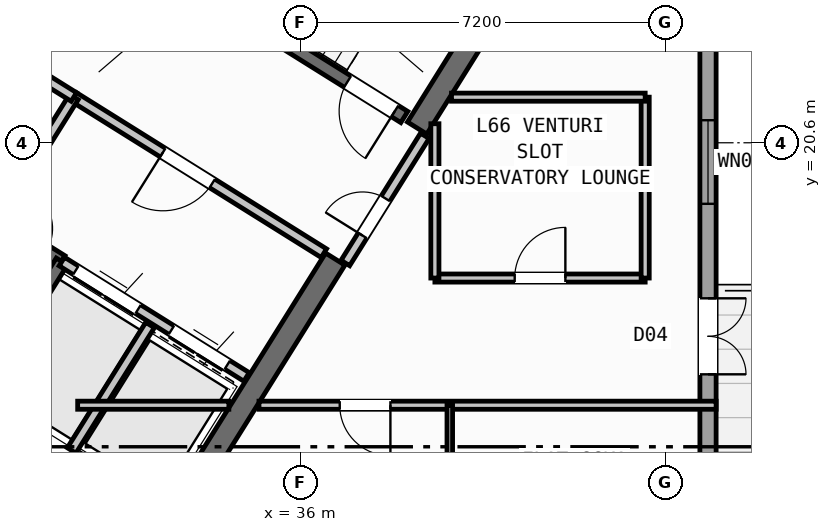
"""IFC4 building model, lengths in metres.
Left out: names, types, materials, properties, quantities, classifications, styles, units other than length and angle.
Written with IfcOpenShell. Run it as: python <this file> out.ifc"""

import sys

from ifc_helpers import new_model, si_unit, direction, frame, frame_2d, origin, place, context, subcontext, project, spatial, rectangle, extrude, source, transform, mapped, element, fill, save


model = new_model("IFC4")
c1 = context("Model", 3, precision=1e-05, world=origin(), true_north=direction((0.0, 1.0)))
c2 = subcontext(c1, "Body", "Model", "MODEL_VIEW")
j1 = project(units=[si_unit("LENGTHUNIT", "METRE"), si_unit("PLANEANGLEUNIT", "RADIAN")], contexts=[c1])
p1 = place(None, origin())
s1 = spatial("IfcSite", under=j1, at=p1, CompositionType="ELEMENT")
p2 = place(p1, origin())
s2 = spatial("IfcBuilding", under=s1, at=p2, CompositionType="ELEMENT")
p3 = place(p2, frame((0.0, 0.0, 262.8)))
s3 = spatial("IfcBuildingStorey", under=s2, at=p3, CompositionType="ELEMENT", Elevation=262.8)
p4 = place(p3, frame((33.324, 12.503, 0.0), z_axis=(0.0, 0.0, 1.0), x_axis=(-0.848043529849, 0.529926571782, 0.0)))
e1 = element("IfcWall", 1, at=p4, inside=s3, PredefinedType="SHEAR", context=c2, shape_type="SweptSolid", body=[
    extrude(rectangle(XDim=13.04, YDim=0.45, at=frame_2d((6.52, 0.0))), origin(), (0.0, 0.0, 1.0), 3.35),
])
p5 = place(p3, frame((40.221, 23.965, 0.0), z_axis=(0.0, 0.0, 1.0), x_axis=(-0.529902075036, -0.848058836916, 0.0)))
e2 = element("IfcWall", 2, at=p5, inside=s3, PredefinedType="SHEAR", context=c2, shape_type="SweptSolid", body=[
    extrude(rectangle(XDim=3.625, YDim=0.45, at=frame_2d((1.812, 0.0))), origin(), (0.0, 0.0, 1.0), 3.35),
])
p6 = place(p3, frame((36.683, 18.304, 0.0), z_axis=(0.0, 0.0, 1.0), x_axis=(-0.529904039071, -0.848057609704, 0.0)))
e3 = element("IfcWall", 3, at=p6, inside=s3, PredefinedType="SHEAR", context=c2, shape_type="SweptSolid", body=[
    extrude(rectangle(XDim=6.475, YDim=0.45, at=frame_2d((3.238, 0.0))), origin(), (0.0, 0.0, 1.0), 3.35),
])
p7 = place(p3, frame((44.04, 23.04, 0.0), z_axis=(0.0, 0.0, 1.0), x_axis=(0.0, -1.0, 0.0)))
e4 = element("IfcWall", 4, at=p7, inside=s3, PredefinedType="STANDARD", context=c2, shape_type="SweptSolid", body=[
    extrude(rectangle(XDim=21.08, YDim=0.32, at=frame_2d((10.54, 0.0))), origin(), (0.0, 0.0, 1.0), 3.35),
])
p8 = place(p7, frame((5.51, 0.0, 0.0)))
e5 = element("IfcOpeningElement", 5, at=p8, cuts=e4, PredefinedType="OPENING", context=c2, shape_type="SweptSolid", body=[
    extrude(rectangle(XDim=1.5, YDim=2.25, at=frame_2d((0.75, 1.125))), frame((0.0, 0.17, 0.0), z_axis=(0.0, -1.0, 0.0), x_axis=(1.0, 0.0, 0.0)), (0.0, 0.0, 1.0), 0.34),
])
p9 = place(p7, frame((1.995, 0.0, 0.9)))
e6 = element("IfcOpeningElement", 6, at=p9, cuts=e4, PredefinedType="OPENING", context=c2, shape_type="SweptSolid", body=[
    extrude(rectangle(XDim=1.65, YDim=1.45, at=frame_2d((0.825, 0.725))), frame((0.0, 0.17, 0.0), z_axis=(0.0, -1.0, 0.0), x_axis=(1.0, 0.0, 0.0)), (0.0, 0.0, 1.0), 0.34),
])
p10 = place(p7, frame((8.685, 0.0, 0.9)))
e7 = element("IfcOpeningElement", 7, at=p10, cuts=e4, PredefinedType="OPENING", context=c2, shape_type="SweptSolid", body=[
    extrude(rectangle(XDim=1.35, YDim=1.45, at=frame_2d((0.675, 0.725))), frame((0.0, 0.17, 0.0), z_axis=(0.0, -1.0, 0.0), x_axis=(1.0, 0.0, 0.0)), (0.0, 0.0, 1.0), 0.34),
])
p11 = place(p7, frame((12.873, 0.0, 0.95)))
e8 = element("IfcOpeningElement", 8, at=p11, cuts=e4, PredefinedType="OPENING", context=c2, shape_type="SweptSolid", body=[
    extrude(rectangle(XDim=1.95, YDim=1.35, at=frame_2d((0.975, 0.675))), frame((0.0, 0.17, 0.0), z_axis=(0.0, -1.0, 0.0), x_axis=(1.0, 0.0, 0.0)), (0.0, 0.0, 1.0), 0.34),
])
p12 = place(p7, frame((18.413, 0.0, 1.0)))
e9 = element("IfcOpeningElement", 9, at=p12, cuts=e4, PredefinedType="OPENING", context=c2, shape_type="SweptSolid", body=[
    extrude(rectangle(XDim=0.9, YDim=1.25, at=frame_2d((0.45, 0.625))), frame((0.0, 0.17, 0.0), z_axis=(0.0, -1.0, 0.0), x_axis=(1.0, 0.0, 0.0)), (0.0, 0.0, 1.0), 0.34),
])
p13 = place(p3, frame((31.28, 18.261, 0.0), z_axis=(0.0, 0.0, 1.0), x_axis=(-0.848051618787, 0.529913626805, 0.0)))
e10 = element("IfcWall", 10, at=p13, inside=s3, PredefinedType="SHEAR", context=c2, shape_type="SweptSolid", body=[
    extrude(rectangle(XDim=7.46, YDim=0.26, at=frame_2d((3.73, 0.0))), origin(), (0.0, 0.0, 1.0), 3.35),
])
p14 = place(p13, frame((0.36, 0.0, 0.0)))
e11 = element("IfcOpeningElement", 11, at=p14, cuts=e10, PredefinedType="OPENING", context=c2, shape_type="SweptSolid", body=[
    extrude(rectangle(XDim=0.86, YDim=2.05, at=frame_2d((0.43, 1.025))), frame((0.0, 0.14, 0.0), z_axis=(0.0, -1.0, 0.0), x_axis=(1.0, 0.0, 0.0)), (0.0, 0.0, 1.0), 0.28),
])
p15 = place(p3, frame((31.288, 18.256, 0.0), z_axis=(0.0, 0.0, 1.0), x_axis=(-0.529943379326, -0.848033026897, 0.0)))
e12 = element("IfcWall", 12, at=p15, inside=s3, PredefinedType="SHEAR", context=c2, shape_type="SweptSolid", body=[
    extrude(rectangle(XDim=3.16, YDim=0.26, at=frame_2d((1.58, 0.0))), origin(), (0.0, 0.0, 1.0), 3.35),
])
p16 = place(p3, frame((38.046, 21.108, 0.0), z_axis=(0.0, 0.0, 1.0), x_axis=(-0.848054434086, 0.529909121291, 0.0)))
e13 = element("IfcWall", 13, at=p16, inside=s3, PredefinedType="SHEAR", context=c2, shape_type="SweptSolid", body=[
    extrude(rectangle(XDim=7.33, YDim=0.26, at=frame_2d((3.665, 0.0))), origin(), (0.0, 0.0, 1.0), 3.35),
])
p17 = place(p16, frame((0.22, 0.0, 0.0)))
e14 = element("IfcOpeningElement", 14, at=p17, cuts=e13, PredefinedType="OPENING", context=c2, shape_type="SweptSolid", body=[
    extrude(rectangle(XDim=1.1, YDim=2.1, at=frame_2d((0.55, 1.05))), frame((0.0, 0.14, 0.0), z_axis=(0.0, -1.0, 0.0), x_axis=(1.0, 0.0, 0.0)), (0.0, 0.0, 1.0), 0.28),
])
p18 = place(p3, frame((34.933, 15.978, 0.0), z_axis=(0.0, 0.0, 1.0), x_axis=(-0.848055739377, 0.529907032327, 0.0)))
e15 = element("IfcWall", 15, at=p18, inside=s3, PredefinedType="STANDARD", context=c2, shape_type="SweptSolid", body=[
    extrude(rectangle(XDim=4.298, YDim=0.2, at=frame_2d((2.149, 0.0))), origin(), (0.0, 0.0, 1.0), 3.34),
])
p19 = place(p18, frame((0.448, 0.0, 0.0)))
e16 = element("IfcOpeningElement", 16, at=p19, cuts=e15, PredefinedType="OPENING", context=c2, shape_type="SweptSolid", body=[
    extrude(rectangle(XDim=1.3, YDim=2.2, at=frame_2d((0.65, 1.1))), frame((0.0, 0.11, 0.0), z_axis=(0.0, -1.0, 0.0), x_axis=(1.0, 0.0, 0.0)), (0.0, 0.0, 1.0), 0.22),
])
p20 = place(p18, frame((2.523, 0.0, 0.0)))
e17 = element("IfcOpeningElement", 17, at=p20, cuts=e15, PredefinedType="OPENING", context=c2, shape_type="SweptSolid", body=[
    extrude(rectangle(XDim=1.45, YDim=2.25, at=frame_2d((0.725, 1.125))), frame((0.0, 0.11, 0.0), z_axis=(0.0, -1.0, 0.0), x_axis=(1.0, 0.0, 0.0)), (0.0, 0.0, 1.0), 0.22),
])
p21 = place(p3, frame((36.459, 18.421, 0.0), z_axis=(0.0, 0.0, 1.0), x_axis=(-0.848059591691, 0.529900867089, 0.0)))
e18 = element("IfcWall", 18, at=p21, inside=s3, PredefinedType="STANDARD", context=c2, shape_type="SweptSolid", body=[
    extrude(rectangle(XDim=5.818, YDim=0.2, at=frame_2d((2.909, 0.0))), origin(), (0.0, 0.0, 1.0), 3.34),
])
p22 = place(p21, frame((2.598, 0.0, 0.0)))
e19 = element("IfcOpeningElement", 19, at=p22, cuts=e18, PredefinedType="OPENING", context=c2, shape_type="SweptSolid", body=[
    extrude(rectangle(XDim=1.15, YDim=2.1, at=frame_2d((0.575, 1.05))), frame((0.0, 0.11, 0.0), z_axis=(0.0, -1.0, 0.0), x_axis=(1.0, 0.0, 0.0)), (0.0, 0.0, 1.0), 0.22),
])
p23 = place(p3, frame((33.029, 17.003, 0.0), z_axis=(0.0, 0.0, 1.0), x_axis=(-0.529916267533, -0.848049968695, 0.0)))
e20 = element("IfcWall", 20, at=p23, inside=s3, PredefinedType="STANDARD", context=c2, shape_type="SweptSolid", body=[
    extrude(rectangle(XDim=2.92, YDim=0.2, at=frame_2d((1.46, 0.0))), origin(), (0.0, 0.0, 1.0), 3.34),
])
p24 = place(p3, frame((31.525, 21.504, 0.0), z_axis=(0.0, 0.0, 1.0), x_axis=(-0.529907497854, -0.848055448493, 0.0)))
e21 = element("IfcWall", 21, at=p24, inside=s3, PredefinedType="STANDARD", context=c2, shape_type="SweptSolid", body=[
    extrude(rectangle(XDim=2.88, YDim=0.2, at=frame_2d((1.44, 0.0))), origin(), (0.0, 0.0, 1.0), 3.34),
])
p25 = place(p3, frame((31.525, 21.504, 0.0), z_axis=(0.0, 0.0, 1.0), x_axis=(-0.848042066329, 0.529928913853, 0.0)))
e22 = element("IfcWall", 22, at=p25, inside=s3, PredefinedType="STANDARD", context=c2, shape_type="SweptSolid", body=[
    extrude(rectangle(XDim=6.268, YDim=0.2, at=frame_2d((3.134, 0.0))), origin(), (0.0, 0.0, 1.0), 3.34),
])
p26 = place(p25, frame((4.4, 0.0, 0.0)))
e23 = element("IfcOpeningElement", 23, at=p26, cuts=e22, PredefinedType="OPENING", context=c2, shape_type="SweptSolid", body=[
    extrude(rectangle(XDim=0.86, YDim=2.05, at=frame_2d((0.43, 1.025))), frame((0.0, 0.11, 0.0), z_axis=(0.0, -1.0, 0.0), x_axis=(1.0, 0.0, 0.0)), (0.0, 0.0, 1.0), 0.22),
])
p27 = place(p25, frame((1.45, 0.0, 0.0)))
e24 = element("IfcOpeningElement", 24, at=p27, cuts=e22, PredefinedType="OPENING", context=c2, shape_type="SweptSolid", body=[
    extrude(rectangle(XDim=0.86, YDim=2.05, at=frame_2d((0.43, 1.025))), frame((0.0, 0.11, 0.0), z_axis=(0.0, -1.0, 0.0), x_axis=(1.0, 0.0, 0.0)), (0.0, 0.0, 1.0), 0.22),
])
p28 = place(p3, frame((32.164, 10.374, 0.0), z_axis=(0.0, 0.0, 1.0), x_axis=(-0.848044107957, 0.529925646633, 0.0)))
e25 = element("IfcWall", 25, at=p28, inside=s3, PredefinedType="PARTITIONING", context=c2, shape_type="SweptSolid", body=[
    extrude(rectangle(XDim=15.57, YDim=0.16, at=frame_2d((7.785, 0.0))), origin(), (0.0, 0.0, 1.0), 3.34),
])
p29 = place(p28, frame((10.83, 0.0, 0.0)))
e26 = element("IfcOpeningElement", 26, at=p29, cuts=e25, PredefinedType="OPENING", context=c2, shape_type="SweptSolid", body=[
    extrude(rectangle(XDim=1.0, YDim=2.1, at=frame_2d((0.5, 1.05))), frame((0.0, 0.09, 0.0), z_axis=(0.0, -1.0, 0.0), x_axis=(1.0, 0.0, 0.0)), (0.0, 0.0, 1.0), 0.18),
])
p30 = place(p3, frame((38.451, 20.737, 0.0), z_axis=(0.0, 0.0, 1.0), x_axis=(-0.529924799939, -0.848044637038, 0.0)))
e27 = element("IfcWall", 27, at=p30, inside=s3, PredefinedType="STANDARD", context=c2, shape_type="SweptSolid", body=[
    extrude(rectangle(XDim=2.96, YDim=0.2, at=frame_2d((1.48, 0.0))), origin(), (0.0, 0.0, 1.0), 3.34),
])
p31 = place(p30, frame((1.46, 0.0, 0.0)))
e28 = element("IfcOpeningElement", 28, at=p31, cuts=e27, PredefinedType="OPENING", context=c2, shape_type="SweptSolid", body=[
    extrude(rectangle(XDim=0.86, YDim=2.05, at=frame_2d((0.43, 1.025))), frame((0.0, 0.11, 0.0), z_axis=(0.0, -1.0, 0.0), x_axis=(1.0, 0.0, 0.0)), (0.0, 0.0, 1.0), 0.22),
])
p32 = place(p3, frame((31.6, 15.42, 0.0), z_axis=(0.0, 0.0, 1.0), x_axis=(1.0, 0.0, 0.0)))
e29 = element("IfcWall", 29, at=p32, inside=s3, PredefinedType="PARTITIONING", context=c2, shape_type="SweptSolid", body=[
    extrude(rectangle(XDim=2.984, YDim=0.16, at=frame_2d((1.492, 0.0))), origin(), (0.0, 0.0, 1.0), 3.34),
])
p33 = place(p3, frame((35.178, 15.42, 0.0), z_axis=(0.0, 0.0, 1.0), x_axis=(1.0, 0.0, 0.0)))
e30 = element("IfcWall", 30, at=p33, inside=s3, PredefinedType="PARTITIONING", context=c2, shape_type="SweptSolid", body=[
    extrude(rectangle(XDim=9.021, YDim=0.16, at=frame_2d((4.511, 0.0))), origin(), (0.0, 0.0, 1.0), 3.34),
])
p34 = place(p33, frame((1.594, 0.0, 0.0)))
e31 = element("IfcOpeningElement", 31, at=p34, cuts=e30, PredefinedType="OPENING", context=c2, shape_type="SweptSolid", body=[
    extrude(rectangle(XDim=1.0, YDim=2.1, at=frame_2d((0.5, 1.05))), frame((0.0, 0.09, 0.0), z_axis=(0.0, -1.0, 0.0), x_axis=(1.0, 0.0, 0.0)), (0.0, 0.0, 1.0), 0.18),
])
p35 = place(p3, frame((38.65, 17.93, 0.0), z_axis=(0.0, 0.0, 1.0), x_axis=(1.0, 0.0, 0.0)))
e32 = element("IfcWall", 32, at=p35, inside=s3, PredefinedType="PARTITIONING", context=c2, shape_type="SweptSolid", body=[
    extrude(rectangle(XDim=4.15, YDim=0.16, at=frame_2d((2.075, 0.0))), origin(), (0.0, 0.0, 1.0), 3.34),
])
p36 = place(p35, frame((1.575, 0.0, 0.0)))
e33 = element("IfcOpeningElement", 33, at=p36, cuts=e32, PredefinedType="OPENING", context=c2, shape_type="SweptSolid", body=[
    extrude(rectangle(XDim=1.0, YDim=2.1, at=frame_2d((0.5, 1.05))), frame((0.0, 0.09, 0.0), z_axis=(0.0, -1.0, 0.0), x_axis=(1.0, 0.0, 0.0)), (0.0, 0.0, 1.0), 0.18),
])
p37 = place(p3, frame((38.65, 17.93, 0.0), z_axis=(0.0, 0.0, 1.0), x_axis=(0.0, 1.0, 0.0)))
e34 = element("IfcWall", 34, at=p37, inside=s3, PredefinedType="PARTITIONING", context=c2, shape_type="SweptSolid", body=[
    extrude(rectangle(XDim=3.046, YDim=0.16, at=frame_2d((1.523, 0.0))), origin(), (0.0, 0.0, 1.0), 3.34),
])
p38 = place(p3, frame((42.8, 17.93, 0.0), z_axis=(0.0, 0.0, 1.0), x_axis=(0.0, 1.0, 0.0)))
e35 = element("IfcWall", 35, at=p38, inside=s3, PredefinedType="PARTITIONING", context=c2, shape_type="SweptSolid", body=[
    extrude(rectangle(XDim=3.57, YDim=0.16, at=frame_2d((1.785, 0.0))), origin(), (0.0, 0.0, 1.0), 3.34),
])
p39 = place(p3, frame((38.978, 21.5, 0.0), z_axis=(0.0, 0.0, 1.0), x_axis=(1.0, 0.0, 0.0)))
e36 = element("IfcWall", 36, at=p39, inside=s3, PredefinedType="PARTITIONING", context=c2, shape_type="SweptSolid", body=[
    extrude(rectangle(XDim=3.823, YDim=0.16, at=frame_2d((1.911, 0.0))), origin(), (0.0, 0.0, 1.0), 3.34),
])
p40 = place(p3, frame((38.944, 1.96, 0.0), z_axis=(0.0, 0.0, 1.0), x_axis=(0.0, 1.0, 0.0)))
e37 = element("IfcWall", 37, at=p40, inside=s3, PredefinedType="PARTITIONING", context=c2, shape_type="SweptSolid", body=[
    extrude(rectangle(XDim=13.46, YDim=0.11, at=frame_2d((6.73, 0.0))), origin(), (0.0, 0.0, 1.0), 3.34),
])
p41 = place(p40, frame((5.5, 0.0, 0.0)))
e38 = element("IfcOpeningElement", 38, at=p41, cuts=e37, PredefinedType="OPENING", context=c2, shape_type="SweptSolid", body=[
    extrude(rectangle(XDim=0.92, YDim=2.08, at=frame_2d((0.46, 1.04))), frame((0.0, 0.065, 0.0), z_axis=(0.0, -1.0, 0.0), x_axis=(1.0, 0.0, 0.0)), (0.0, 0.0, 1.0), 0.13),
])
p42 = place(p40, frame((10.45, 0.0, 0.0)))
e39 = element("IfcOpeningElement", 39, at=p42, cuts=e37, PredefinedType="OPENING", context=c2, shape_type="SweptSolid", body=[
    extrude(rectangle(XDim=0.88, YDim=2.08, at=frame_2d((0.44, 1.04))), frame((0.0, 0.065, 0.0), z_axis=(0.0, -1.0, 0.0), x_axis=(1.0, 0.0, 0.0)), (0.0, 0.0, 1.0), 0.13),
])
m1 = source(origin(), c2, "Body", "SweptSolid", [
    extrude(rectangle(XDim=1.5, YDim=2.25, at=frame_2d((0.75, 1.125))), frame((0.0, 0.025, 0.0), z_axis=(0.0, -1.0, 0.0), x_axis=(1.0, 0.0, 0.0)), (0.0, 0.0, 1.0), 0.05),
])
p43 = place(p8, origin())
e40 = element("IfcDoor", 40, at=p43, inside=s3, OperationType="DOUBLE_DOOR_SINGLE_SWING", PredefinedType="DOOR", context=c2, shape_type="MappedRepresentation", body=[
    mapped(m1, transform((0.0, 0.0, 0.0), scale=1.0)),
])
fill(e5, e40)
m2 = source(origin(), c2, "Body", "SweptSolid", [
    extrude(rectangle(XDim=1.65, YDim=1.45, at=frame_2d((0.825, 0.725))), frame((0.0, 0.03, 0.0), z_axis=(0.0, -1.0, 0.0), x_axis=(1.0, 0.0, 0.0)), (0.0, 0.0, 1.0), 0.06),
])
p44 = place(p9, origin())
e41 = element("IfcWindow", 41, at=p44, inside=s3, PartitioningType="SINGLE_PANEL", PredefinedType="WINDOW", context=c2, shape_type="MappedRepresentation", body=[
    mapped(m2, transform((0.0, 0.0, 0.0), scale=1.0)),
])
fill(e6, e41)
m3 = source(origin(), c2, "Body", "SweptSolid", [
    extrude(rectangle(XDim=1.1, YDim=2.1, at=frame_2d((0.55, 1.05))), frame((0.0, 0.025, 0.0), z_axis=(0.0, -1.0, 0.0), x_axis=(1.0, 0.0, 0.0)), (0.0, 0.0, 1.0), 0.05),
])
p45 = place(p17, origin())
e42 = element("IfcDoor", 42, at=p45, inside=s3, OperationType="SINGLE_SWING_LEFT", PredefinedType="DOOR", context=c2, shape_type="MappedRepresentation", body=[
    mapped(m3, transform((0.0, 0.0, 0.0), scale=1.0)),
])
fill(e14, e42)
m4 = source(origin(), c2, "Body", "SweptSolid", [
    extrude(rectangle(XDim=1.15, YDim=2.1, at=frame_2d((0.575, 1.05))), frame((0.0, 0.025, 0.0), z_axis=(0.0, -1.0, 0.0), x_axis=(1.0, 0.0, 0.0)), (0.0, 0.0, 1.0), 0.05),
])
p46 = place(p22, origin())
e43 = element("IfcDoor", 43, at=p46, inside=s3, OperationType="SINGLE_SWING_RIGHT", PredefinedType="DOOR", context=c2, shape_type="MappedRepresentation", body=[
    mapped(m4, transform((0.0, 0.0, 0.0), scale=1.0)),
])
fill(e19, e43)
m5 = source(origin(), c2, "Body", "SweptSolid", [
    extrude(rectangle(XDim=1.3, YDim=2.2, at=frame_2d((0.65, 1.1))), frame((0.0, 0.025, 0.0), z_axis=(0.0, -1.0, 0.0), x_axis=(1.0, 0.0, 0.0)), (0.0, 0.0, 1.0), 0.05),
])
p47 = place(p19, origin())
e44 = element("IfcDoor", 44, at=p47, inside=s3, OperationType="DOUBLE_DOOR_SLIDING", PredefinedType="DOOR", context=c2, shape_type="MappedRepresentation", body=[
    mapped(m5, transform((0.0, 0.0, 0.0), scale=1.0)),
])
fill(e16, e44)
m6 = source(origin(), c2, "Body", "SweptSolid", [
    extrude(rectangle(XDim=1.45, YDim=2.25, at=frame_2d((0.725, 1.125))), frame((0.0, 0.025, 0.0), z_axis=(0.0, -1.0, 0.0), x_axis=(1.0, 0.0, 0.0)), (0.0, 0.0, 1.0), 0.05),
])
p48 = place(p20, origin())
e45 = element("IfcDoor", 45, at=p48, inside=s3, OperationType="DOUBLE_DOOR_SLIDING", PredefinedType="DOOR", context=c2, shape_type="MappedRepresentation", body=[
    mapped(m6, transform((0.0, 0.0, 0.0), scale=1.0)),
])
fill(e17, e45)
m7 = source(origin(), c2, "Body", "SweptSolid", [
    extrude(rectangle(XDim=1.0, YDim=2.1, at=frame_2d((0.5, 1.05))), frame((0.0, 0.025, 0.0), z_axis=(0.0, -1.0, 0.0), x_axis=(1.0, 0.0, 0.0)), (0.0, 0.0, 1.0), 0.05),
])
p49 = place(p36, origin())
e46 = element("IfcDoor", 46, at=p49, inside=s3, OperationType="SINGLE_SWING_RIGHT", PredefinedType="DOOR", context=c2, shape_type="MappedRepresentation", body=[
    mapped(m7, transform((0.0, 0.0, 0.0), scale=1.0)),
])
fill(e33, e46)
m8 = source(origin(), c2, "Body", "SweptSolid", [
    extrude(rectangle(XDim=0.86, YDim=2.05, at=frame_2d((0.43, 1.025))), frame((0.0, 0.025, 0.0), z_axis=(0.0, -1.0, 0.0), x_axis=(1.0, 0.0, 0.0)), (0.0, 0.0, 1.0), 0.05),
])
p50 = place(p31, frame((0.86, 0.0, 0.0), z_axis=(0.0, 0.0, 1.0), x_axis=(-1.0, 0.0, 0.0)))
e47 = element("IfcDoor", 47, at=p50, inside=s3, OperationType="SINGLE_SWING_LEFT", PredefinedType="DOOR", context=c2, shape_type="MappedRepresentation", body=[
    mapped(m8, transform((0.0, 0.0, 0.0), scale=1.0)),
])
fill(e28, e47)
p51 = place(p34, frame((1.0, 0.0, 0.0), z_axis=(0.0, 0.0, 1.0), x_axis=(-1.0, 0.0, 0.0)))
e48 = element("IfcDoor", 48, at=p51, inside=s3, OperationType="SINGLE_SWING_LEFT", PredefinedType="DOOR", context=c2, shape_type="MappedRepresentation", body=[
    mapped(m7, transform((0.0, 0.0, 0.0), scale=1.0)),
])
fill(e31, e48)
save(model, sys.argv[1])
